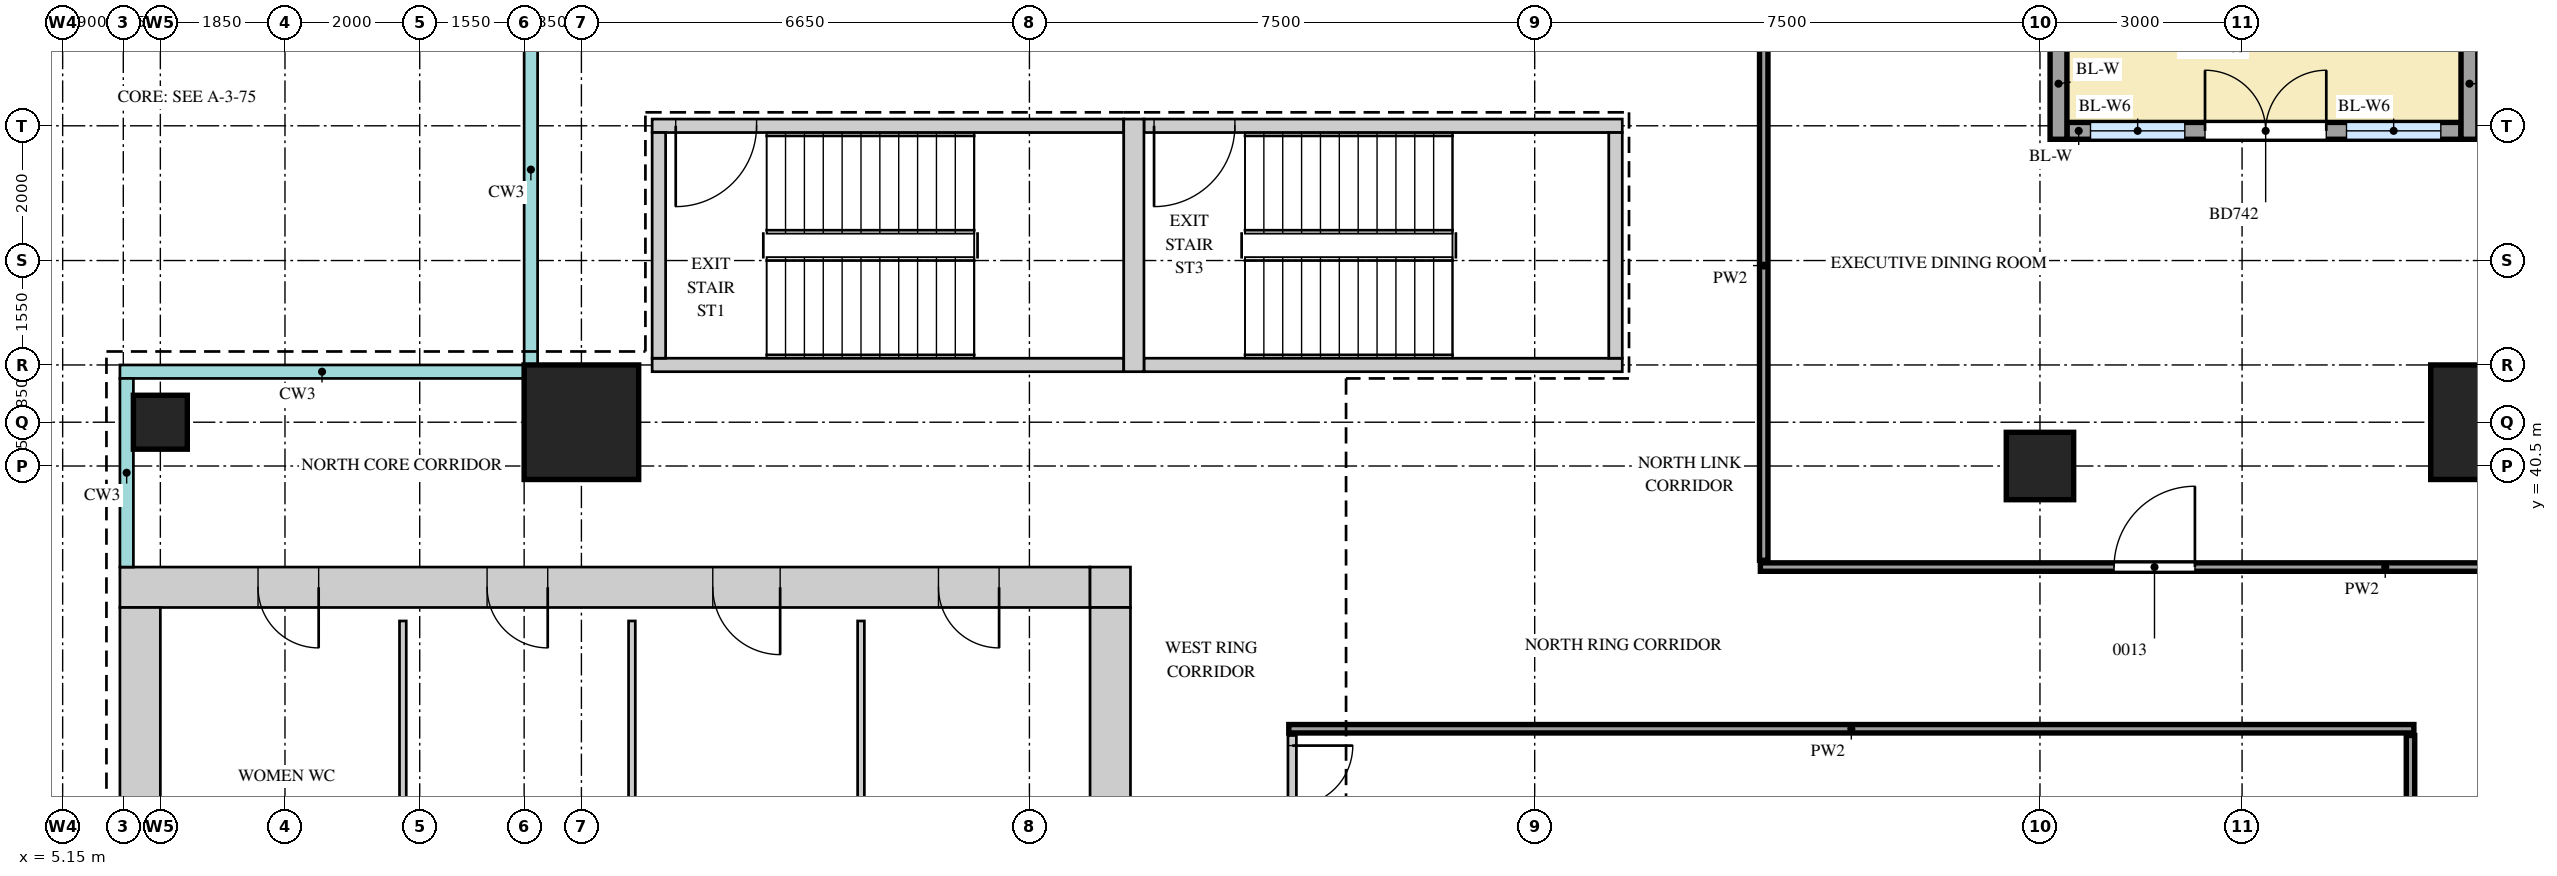
"""IFC4 building model, lengths in metres.
Left out: names, types, materials, properties, quantities, classifications, styles, units other than length and angle.
Written with IfcOpenShell. Run it as: python <this file> out.ifc"""

import sys

from ifc_helpers import new_model, si_unit, direction, frame, frame_2d, origin, origin_2d, place, context, subcontext, project, spatial, rectangle, extrude, source, transform, mapped, element, fill, save


model = new_model("IFC4")
c1 = context("Model", 3, precision=1e-05, world=origin(), true_north=direction((0.0, 1.0)))
c2 = subcontext(c1, "Body", "Model", "MODEL_VIEW")
j1 = project(units=[si_unit("LENGTHUNIT", "METRE"), si_unit("PLANEANGLEUNIT", "RADIAN")], contexts=[c1])
p1 = place(None, origin())
s1 = spatial("IfcSite", under=j1, at=p1, CompositionType="ELEMENT")
p2 = place(p1, origin())
s2 = spatial("IfcBuilding", under=s1, at=p2, CompositionType="ELEMENT")
p3 = place(p2, frame((0.0, 0.0, 326.2)))
s3 = spatial("IfcBuildingStorey", under=s2, at=p3, CompositionType="ELEMENT", Elevation=326.2)
m1 = source(origin(), c2, "Body", "SweptSolid", [
    extrude(rectangle(XDim=14.4, YDim=0.6, at=frame_2d((7.2, 0.0))), origin(), (0.0, 0.0, 1.0), 3.75),
])
p4 = place(p3, frame((6.0, 38.7, 0.0), z_axis=(0.0, 0.0, 1.0), x_axis=(1.0, 0.0, 0.0)))
e1 = element("IfcWall", 1, at=p4, inside=s3, PredefinedType="SHEAR", context=c2, shape_type="MappedRepresentation", body=[
    mapped(m1, transform((0.0, 0.0, 0.0))),
])
m2 = source(origin(), c2, "Body", "SweptSolid", [
    extrude(rectangle(XDim=0.9, YDim=2.1, at=frame_2d((0.45, 1.05))), frame((0.0, 0.31, 0.0), z_axis=(0.0, -1.0, 0.0), x_axis=(1.0, 0.0, 0.0)), (0.0, 0.0, 1.0), 0.62),
])
p5 = place(p4, frame((2.05, 0.0, 0.0)))
e2 = element("IfcOpeningElement", 2, at=p5, cuts=e1, PredefinedType="OPENING", context=c2, shape_type="MappedRepresentation", body=[
    mapped(m2, transform((0.0, 0.0, 0.0))),
])
p6 = place(p4, frame((5.45, 0.0, 0.0)))
e3 = element("IfcOpeningElement", 3, at=p6, cuts=e1, PredefinedType="OPENING", context=c2, shape_type="MappedRepresentation", body=[
    mapped(m2, transform((0.0, 0.0, 0.0))),
])
m3 = source(origin(), c2, "Body", "SweptSolid", [
    extrude(rectangle(XDim=1.0, YDim=2.1, at=frame_2d((0.5, 1.05))), frame((0.0, 0.31, 0.0), z_axis=(0.0, -1.0, 0.0), x_axis=(1.0, 0.0, 0.0)), (0.0, 0.0, 1.0), 0.62),
])
p7 = place(p4, frame((8.8, 0.0, 0.0)))
e4 = element("IfcOpeningElement", 4, at=p7, cuts=e1, PredefinedType="OPENING", context=c2, shape_type="MappedRepresentation", body=[
    mapped(m3, transform((0.0, 0.0, 0.0))),
])
p8 = place(p4, frame((12.15, 0.0, 0.0)))
e5 = element("IfcOpeningElement", 5, at=p8, cuts=e1, PredefinedType="OPENING", context=c2, shape_type="MappedRepresentation", body=[
    mapped(m2, transform((0.0, 0.0, 0.0))),
])
m4 = source(origin(), c2, "Body", "SweptSolid", [
    extrude(rectangle(XDim=0.6, YDim=0.6, at=frame_2d((0.3, 0.0))), origin(), (0.0, 0.0, 1.0), 3.75),
])
p9 = place(p3, frame((20.4, 38.7, 0.0), z_axis=(0.0, 0.0, 1.0), x_axis=(1.0, 0.0, 0.0)))
e6 = element("IfcWall", 6, at=p9, inside=s3, PredefinedType="SHEAR", context=c2, shape_type="MappedRepresentation", body=[
    mapped(m4, transform((0.0, 0.0, 0.0))),
])
m5 = source(origin(), c2, "Body", "SweptSolid", [
    extrude(rectangle(XDim=22.8, YDim=0.6, at=frame_2d((11.4, 0.0))), origin(), (0.0, 0.0, 1.0), 3.75),
])
p10 = place(p3, frame((20.7, 15.6, 0.0), z_axis=(0.0, 0.0, 1.0), x_axis=(0.0, 1.0, 0.0)))
e7 = element("IfcWall", 7, at=p10, inside=s3, PredefinedType="SHEAR", context=c2, shape_type="MappedRepresentation", body=[
    mapped(m5, transform((0.0, 0.0, 0.0))),
])
m6 = source(origin(), c2, "Body", "SweptSolid", [
    extrude(rectangle(XDim=1.8, YDim=2.1, at=frame_2d((0.9, 1.05))), frame((0.0, 0.31, 0.0), z_axis=(0.0, -1.0, 0.0), x_axis=(1.0, 0.0, 0.0)), (0.0, 0.0, 1.0), 0.62),
])
p11 = place(p10, frame((10.9, 0.0, 0.0)))
e8 = element("IfcOpeningElement", 8, at=p11, cuts=e7, PredefinedType="OPENING", context=c2, shape_type="MappedRepresentation", body=[
    mapped(m6, transform((0.0, 0.0, 0.0))),
])
p12 = place(p10, frame((0.55, 0.0, 0.0)))
e9 = element("IfcOpeningElement", 9, at=p12, cuts=e7, PredefinedType="OPENING", context=c2, shape_type="MappedRepresentation", body=[
    mapped(m2, transform((0.0, 0.0, 0.0))),
])
p13 = place(p10, frame((4.1, 0.0, 0.0)))
e10 = element("IfcOpeningElement", 10, at=p13, cuts=e7, PredefinedType="OPENING", context=c2, shape_type="MappedRepresentation", body=[
    mapped(m2, transform((0.0, 0.0, 0.0))),
])
p14 = place(p3, frame((6.3, 15.6, 0.0), z_axis=(0.0, 0.0, 1.0), x_axis=(0.0, 1.0, 0.0)))
e11 = element("IfcWall", 11, at=p14, inside=s3, PredefinedType="SHEAR", context=c2, shape_type="MappedRepresentation", body=[
    mapped(m5, transform((0.0, 0.0, 0.0))),
])
m7 = source(origin(), c2, "Body", "SweptSolid", [
    extrude(rectangle(XDim=7.0, YDim=0.2, at=frame_2d((3.5, 0.0))), origin(), (0.0, 0.0, 1.0), 3.75),
])
p15 = place(p3, frame((13.9, 45.55, 0.0), z_axis=(0.0, 0.0, 1.0), x_axis=(1.0, 0.0, 0.0)))
e12 = element("IfcWall", 12, at=p15, inside=s3, PredefinedType="SHEAR", context=c2, shape_type="MappedRepresentation", body=[
    mapped(m7, transform((0.0, 0.0, 0.0))),
])
m8 = source(origin(), c2, "Body", "SweptSolid", [
    extrude(rectangle(XDim=1.2, YDim=2.1, at=frame_2d((0.6, 1.05))), frame((0.0, 0.11, 0.0), z_axis=(0.0, -1.0, 0.0), x_axis=(1.0, 0.0, 0.0)), (0.0, 0.0, 1.0), 0.22),
])
p16 = place(p15, frame((0.35, 0.0, 0.0)))
e13 = element("IfcOpeningElement", 13, at=p16, cuts=e12, PredefinedType="OPENING", context=c2, shape_type="MappedRepresentation", body=[
    mapped(m8, transform((0.0, 0.0, 0.0))),
])
p17 = place(p3, frame((13.9, 42.0, 0.0), z_axis=(0.0, 0.0, 1.0), x_axis=(1.0, 0.0, 0.0)))
e14 = element("IfcWall", 14, at=p17, inside=s3, PredefinedType="SHEAR", context=c2, shape_type="MappedRepresentation", body=[
    mapped(m7, transform((0.0, 0.0, 0.0))),
])
m9 = source(origin(), c2, "Body", "SweptSolid", [
    extrude(rectangle(XDim=7.1, YDim=0.2, at=frame_2d((3.55, 0.0))), origin(), (0.0, 0.0, 1.0), 3.75),
])
p18 = place(p3, frame((21.2, 45.55, 0.0), z_axis=(0.0, 0.0, 1.0), x_axis=(1.0, 0.0, 0.0)))
e15 = element("IfcWall", 15, at=p18, inside=s3, PredefinedType="SHEAR", context=c2, shape_type="MappedRepresentation", body=[
    mapped(m9, transform((0.0, 0.0, 0.0))),
])
p19 = place(p18, frame((0.15, 0.0, 0.0)))
e16 = element("IfcOpeningElement", 16, at=p19, cuts=e15, PredefinedType="OPENING", context=c2, shape_type="MappedRepresentation", body=[
    mapped(m8, transform((0.0, 0.0, 0.0))),
])
p20 = place(p3, frame((21.2, 42.0, 0.0), z_axis=(0.0, 0.0, 1.0), x_axis=(1.0, 0.0, 0.0)))
e17 = element("IfcWall", 17, at=p20, inside=s3, PredefinedType="SHEAR", context=c2, shape_type="MappedRepresentation", body=[
    mapped(m9, transform((0.0, 0.0, 0.0))),
])
m10 = source(origin(), c2, "Body", "SweptSolid", [
    extrude(rectangle(XDim=3.75, YDim=0.3, at=frame_2d((1.875, 0.0))), origin(), (0.0, 0.0, 1.0), 3.75),
])
p21 = place(p3, frame((21.05, 41.9, 0.0), z_axis=(0.0, 0.0, 1.0), x_axis=(0.0, 1.0, 0.0)))
e18 = element("IfcWall", 18, at=p21, inside=s3, PredefinedType="SHEAR", context=c2, shape_type="MappedRepresentation", body=[
    mapped(m10, transform((0.0, 0.0, 0.0))),
])
m11 = source(origin(), c2, "Body", "SweptSolid", [
    extrude(rectangle(XDim=3.35, YDim=0.2, at=frame_2d((1.675, 0.0))), origin(), (0.0, 0.0, 1.0), 3.75),
])
for number, where, z_axis, x_axis in (
    (19, (14.0, 42.1, 0.0), (0.0, 0.0, 1.0), (0.0, 1.0, 0.0)),
    (20, (28.2, 42.1, 0.0), (0.0, 0.0, 1.0), (0.0, 1.0, 0.0)),
):
    element("IfcWall", number, at=place(p3, frame(where, z_axis=z_axis, x_axis=x_axis)), inside=s3, PredefinedType="SHEAR", context=c2, shape_type="MappedRepresentation", body=[
        mapped(m11, transform((0.0, 0.0, 0.0))),
    ])
m12 = source(origin(), c2, "Body", "SweptSolid", [
    extrude(rectangle(XDim=1.7, YDim=1.7, at=origin_2d()), origin(), (0.0, 0.0, 1.0), 3.75),
])
for number, where, z_axis, x_axis in (
    (21, (41.15, 41.15, 0.0), (0.0, 0.0, 1.0), (1.0, 0.0, 0.0)),
    (22, (12.85, 41.15, 0.0), (0.0, 0.0, 1.0), (1.0, 0.0, 0.0)),
):
    element("IfcColumn", number, at=place(p3, frame(where, z_axis=z_axis, x_axis=x_axis)), inside=s3, PredefinedType="COLUMN", context=c2, shape_type="MappedRepresentation", body=[
        mapped(m12, transform((0.0, 0.0, 0.0))),
    ])
m13 = source(origin(), c2, "Body", "SweptSolid", [
    extrude(rectangle(XDim=0.8, YDim=0.8, at=origin_2d()), origin(), (0.0, 0.0, 1.0), 3.75),
])
p22 = place(p3, frame((6.6, 41.15, 0.0), z_axis=(0.0, 0.0, 1.0), x_axis=(1.0, 0.0, 0.0)))
e23 = element("IfcColumn", 23, at=p22, inside=s3, PredefinedType="COLUMN", context=c2, shape_type="MappedRepresentation", body=[
    mapped(m13, transform((0.0, 0.0, 0.0))),
])
m14 = source(origin(), c2, "Body", "SweptSolid", [
    extrude(rectangle(XDim=1.0, YDim=1.0, at=origin_2d()), origin(), (0.0, 0.0, 1.0), 3.75),
])
p23 = place(p3, frame((34.5, 40.5, 0.0), z_axis=(0.0, 0.0, 1.0), x_axis=(1.0, 0.0, 0.0)))
e24 = element("IfcColumn", 24, at=p23, inside=s3, PredefinedType="COLUMN", context=c2, shape_type="MappedRepresentation", body=[
    mapped(m14, transform((0.0, 0.0, 0.0))),
])
m15 = source(origin(), c2, "Body", "SweptSolid", [
    extrude(rectangle(XDim=5.85, YDim=0.25, at=frame_2d((2.925, 0.0))), origin(), (0.0, 0.0, 1.0), 3.75),
])
p24 = place(p3, frame((34.9, 45.475, 0.0), z_axis=(0.0, 0.0, 1.0), x_axis=(1.0, 0.0, 0.0)))
e25 = element("IfcWall", 25, at=p24, inside=s3, PredefinedType="SOLIDWALL", context=c2, shape_type="MappedRepresentation", body=[
    mapped(m15, transform((0.0, 0.0, 0.0))),
])
m16 = source(origin(), c2, "Body", "SweptSolid", [
    extrude(rectangle(XDim=1.4, YDim=2.4, at=frame_2d((0.7, 1.2))), frame((0.0, 0.135, 0.0), z_axis=(0.0, -1.0, 0.0), x_axis=(1.0, 0.0, 0.0)), (0.0, 0.0, 1.0), 0.27),
])
p25 = place(p24, frame((0.35, 0.0, 0.0)))
e26 = element("IfcOpeningElement", 26, at=p25, cuts=e25, PredefinedType="OPENING", context=c2, shape_type="MappedRepresentation", body=[
    mapped(m16, transform((0.0, 0.0, 0.0))),
])
p26 = place(p24, frame((4.15, 0.0, 0.0)))
e27 = element("IfcOpeningElement", 27, at=p26, cuts=e25, PredefinedType="OPENING", context=c2, shape_type="MappedRepresentation", body=[
    mapped(m16, transform((0.0, 0.0, 0.0))),
])
m17 = source(origin(), c2, "Body", "SweptSolid", [
    extrude(rectangle(XDim=1.8, YDim=2.4, at=frame_2d((0.9, 1.2))), frame((0.0, 0.135, 0.0), z_axis=(0.0, -1.0, 0.0), x_axis=(1.0, 0.0, 0.0)), (0.0, 0.0, 1.0), 0.27),
])
p27 = place(p24, frame((2.05, 0.0, 0.0)))
e28 = element("IfcOpeningElement", 28, at=p27, cuts=e25, PredefinedType="OPENING", context=c2, shape_type="MappedRepresentation", body=[
    mapped(m17, transform((0.0, 0.0, 0.0))),
])
m18 = source(origin(), c2, "Body", "SweptSolid", [
    extrude(rectangle(XDim=1.65, YDim=0.25, at=frame_2d((0.825, 0.0))), origin(), (0.0, 0.0, 1.0), 3.75),
])
for number, where, z_axis, x_axis in (
    (29, (34.775, 47.0, 0.0), (0.0, 0.0, 1.0), (0.0, -1.0, 0.0)),
    (30, (40.875, 47.0, 0.0), (0.0, 0.0, 1.0), (0.0, -1.0, 0.0)),
):
    element("IfcWall", number, at=place(p3, frame(where, z_axis=z_axis, x_axis=x_axis)), inside=s3, PredefinedType="SOLIDWALL", context=c2, shape_type="MappedRepresentation", body=[
        mapped(m18, transform((0.0, 0.0, 0.0))),
    ])
m19 = source(origin(), c2, "Body", "SweptSolid", [
    extrude(rectangle(XDim=19.0, YDim=0.125, at=frame_2d((9.5, 0.0))), origin(), (0.0, 0.0, 1.0), 3.8),
])
p28 = place(p3, frame((23.4, 17.5, 0.0), z_axis=(0.0, 0.0, 1.0), x_axis=(0.0, 1.0, 0.0)))
e31 = element("IfcWall", 31, at=p28, inside=s3, PredefinedType="PARTITIONING", context=c2, shape_type="MappedRepresentation", body=[
    mapped(m19, transform((0.0, 0.0, 0.0))),
])
m20 = source(origin(), c2, "Body", "SweptSolid", [
    extrude(rectangle(XDim=1.2, YDim=2.1, at=frame_2d((0.6, 1.05))), frame((0.0, 0.073, 0.0), z_axis=(0.0, -1.0, 0.0), x_axis=(1.0, 0.0, 0.0)), (0.0, 0.0, 1.0), 0.145),
])
p29 = place(p28, frame((8.9, 0.0, 0.0)))
e32 = element("IfcOpeningElement", 32, at=p29, cuts=e31, PredefinedType="OPENING", context=c2, shape_type="MappedRepresentation", body=[
    mapped(m20, transform((0.0, 0.0, 0.0))),
])
m21 = source(origin(), c2, "Body", "SweptSolid", [
    extrude(rectangle(XDim=0.9, YDim=2.1, at=frame_2d((0.45, 1.05))), frame((0.0, 0.073, 0.0), z_axis=(0.0, -1.0, 0.0), x_axis=(1.0, 0.0, 0.0)), (0.0, 0.0, 1.0), 0.145),
])
p30 = place(p28, frame((17.95, 0.0, 0.0)))
e33 = element("IfcOpeningElement", 33, at=p30, cuts=e31, PredefinedType="OPENING", context=c2, shape_type="MappedRepresentation", body=[
    mapped(m21, transform((0.0, 0.0, 0.0))),
])
p31 = place(p3, frame((40.0, 17.5, 0.0), z_axis=(0.0, 0.0, 1.0), x_axis=(0.0, 1.0, 0.0)))
e34 = element("IfcWall", 34, at=p31, inside=s3, PredefinedType="PARTITIONING", context=c2, shape_type="MappedRepresentation", body=[
    mapped(m19, transform((0.0, 0.0, 0.0))),
])
m22 = source(origin(), c2, "Body", "SweptSolid", [
    extrude(rectangle(XDim=6.0, YDim=0.1, at=frame_2d((3.0, 0.0))), origin(), (0.0, 0.0, 1.0), 3.8),
])
for number, where, z_axis, x_axis in (
    (35, (10.2, 32.2, 0.0), (0.0, 0.0, 1.0), (0.0, 1.0, 0.0)),
    (36, (13.6, 32.2, 0.0), (0.0, 0.0, 1.0), (0.0, 1.0, 0.0)),
):
    element("IfcWall", number, at=place(p3, frame(where, z_axis=z_axis, x_axis=x_axis)), inside=s3, PredefinedType="PARTITIONING", context=c2, shape_type="MappedRepresentation", body=[
        mapped(m22, transform((0.0, 0.0, 0.0))),
    ])
m23 = source(origin(), c2, "Body", "SweptSolid", [
    extrude(rectangle(XDim=5.95, YDim=0.1, at=frame_2d((2.975, 0.0))), origin(), (0.0, 0.0, 1.0), 3.8),
])
p32 = place(p3, frame((17.0, 32.25, 0.0), z_axis=(0.0, 0.0, 1.0), x_axis=(0.0, 1.0, 0.0)))
e37 = element("IfcWall", 37, at=p32, inside=s3, PredefinedType="PARTITIONING", context=c2, shape_type="MappedRepresentation", body=[
    mapped(m23, transform((0.0, 0.0, 0.0))),
])
m24 = source(origin(), c2, "Body", "SweptSolid", [
    extrude(rectangle(XDim=16.7, YDim=0.125, at=frame_2d((8.35, 0.0))), origin(), (0.0, 0.0, 1.0), 3.8),
])
p33 = place(p3, frame((23.35, 36.6, 0.0), z_axis=(0.0, 0.0, 1.0), x_axis=(1.0, 0.0, 0.0)))
e38 = element("IfcWall", 38, at=p33, inside=s3, PredefinedType="PARTITIONING", context=c2, shape_type="MappedRepresentation", body=[
    mapped(m24, transform((0.0, 0.0, 0.0))),
])
m25 = source(origin(), c2, "Body", "SweptSolid", [
    extrude(rectangle(XDim=12.1, YDim=0.125, at=frame_2d((6.05, 0.0))), origin(), (0.0, 0.0, 1.0), 3.8),
])
p34 = place(p3, frame((30.35, 39.0, 0.0), z_axis=(0.0, 0.0, 1.0), x_axis=(1.0, 0.0, 0.0)))
e39 = element("IfcWall", 39, at=p34, inside=s3, PredefinedType="PARTITIONING", context=c2, shape_type="MappedRepresentation", body=[
    mapped(m25, transform((0.0, 0.0, 0.0))),
])
p35 = place(p34, frame((5.25, 0.0, 0.0)))
e40 = element("IfcOpeningElement", 40, at=p35, cuts=e39, PredefinedType="OPENING", context=c2, shape_type="MappedRepresentation", body=[
    mapped(m20, transform((0.0, 0.0, 0.0))),
])
m26 = source(origin(), c2, "Body", "SweptSolid", [
    extrude(rectangle(XDim=8.75, YDim=0.125, at=frame_2d((4.375, 0.0))), origin(), (0.0, 0.0, 1.0), 3.8),
])
p36 = place(p3, frame((30.4, 39.1, 0.0), z_axis=(0.0, 0.0, 1.0), x_axis=(0.0, 1.0, 0.0)))
e41 = element("IfcWall", 41, at=p36, inside=s3, PredefinedType="PARTITIONING", context=c2, shape_type="MappedRepresentation", body=[
    mapped(m26, transform((0.0, 0.0, 0.0))),
])
m27 = source(origin(), c2, "Body", "SweptSolid", [
    extrude(rectangle(XDim=1.4, YDim=2.4, at=frame_2d((0.7, 1.2))), frame((0.0, 0.03, 0.0), z_axis=(0.0, -1.0, 0.0), x_axis=(1.0, 0.0, 0.0)), (0.0, 0.0, 1.0), 0.06),
])
p37 = place(p25, origin())
e42 = element("IfcWindow", 42, at=p37, inside=s3, PartitioningType="SINGLE_PANEL", PredefinedType="WINDOW", context=c2, shape_type="MappedRepresentation", body=[
    mapped(m27, transform((0.0, 0.0, 0.0))),
])
fill(e26, e42)
p38 = place(p26, origin())
e43 = element("IfcWindow", 43, at=p38, inside=s3, PartitioningType="SINGLE_PANEL", PredefinedType="WINDOW", context=c2, shape_type="MappedRepresentation", body=[
    mapped(m27, transform((0.0, 0.0, 0.0))),
])
fill(e27, e43)
m28 = source(origin(), c2, "Body", "SweptSolid", [
    extrude(rectangle(XDim=1.8, YDim=2.4, at=frame_2d((0.9, 1.2))), frame((0.0, 0.025, 0.0), z_axis=(0.0, -1.0, 0.0), x_axis=(1.0, 0.0, 0.0)), (0.0, 0.0, 1.0), 0.05),
])
p39 = place(p27, origin())
e44 = element("IfcDoor", 44, at=p39, inside=s3, OperationType="DOUBLE_DOOR_DOUBLE_SWING", PredefinedType="DOOR", context=c2, shape_type="MappedRepresentation", body=[
    mapped(m28, transform((0.0, 0.0, 0.0))),
])
fill(e28, e44)
m29 = source(origin(), c2, "Body", "SweptSolid", [
    extrude(rectangle(XDim=0.9, YDim=2.1, at=frame_2d((0.45, 1.05))), frame((0.0, 0.25, 0.0), z_axis=(0.0, -1.0, 0.0), x_axis=(1.0, 0.0, 0.0)), (0.0, 0.0, 1.0), 0.5),
])
p40 = place(p5, origin())
e45 = element("IfcDoor", 45, at=p40, inside=s3, OperationType="SINGLE_SWING_RIGHT", PredefinedType="DOOR", context=c2, shape_type="MappedRepresentation", body=[
    mapped(m29, transform((0.0, 0.0, 0.0))),
])
fill(e2, e45)
p41 = place(p6, origin())
e46 = element("IfcDoor", 46, at=p41, inside=s3, OperationType="SINGLE_SWING_RIGHT", PredefinedType="DOOR", context=c2, shape_type="MappedRepresentation", body=[
    mapped(m29, transform((0.0, 0.0, 0.0))),
])
fill(e3, e46)
m30 = source(origin(), c2, "Body", "SweptSolid", [
    extrude(rectangle(XDim=1.0, YDim=2.1, at=frame_2d((0.5, 1.05))), frame((0.0, 0.25, 0.0), z_axis=(0.0, -1.0, 0.0), x_axis=(1.0, 0.0, 0.0)), (0.0, 0.0, 1.0), 0.5),
])
p42 = place(p7, origin())
e47 = element("IfcDoor", 47, at=p42, inside=s3, OperationType="SINGLE_SWING_RIGHT", PredefinedType="DOOR", context=c2, shape_type="MappedRepresentation", body=[
    mapped(m30, transform((0.0, 0.0, 0.0))),
])
fill(e4, e47)
p43 = place(p8, origin())
e48 = element("IfcDoor", 48, at=p43, inside=s3, OperationType="SINGLE_SWING_RIGHT", PredefinedType="DOOR", context=c2, shape_type="MappedRepresentation", body=[
    mapped(m29, transform((0.0, 0.0, 0.0))),
])
fill(e5, e48)
m31 = source(origin(), c2, "Body", "SweptSolid", [
    extrude(rectangle(XDim=1.2, YDim=2.1, at=frame_2d((0.6, 1.05))), frame((0.0, 0.025, 0.0), z_axis=(0.0, -1.0, 0.0), x_axis=(1.0, 0.0, 0.0)), (0.0, 0.0, 1.0), 0.05),
])
p44 = place(p35, origin())
e49 = element("IfcDoor", 49, at=p44, inside=s3, OperationType="SINGLE_SWING_LEFT", PredefinedType="DOOR", context=c2, shape_type="MappedRepresentation", body=[
    mapped(m31, transform((0.0, 0.0, 0.0))),
])
fill(e40, e49)
m32 = source(origin(), c2, "Body", "SweptSolid", [
    extrude(rectangle(XDim=0.9, YDim=2.1, at=frame_2d((0.45, 1.05))), frame((0.0, 0.025, 0.0), z_axis=(0.0, -1.0, 0.0), x_axis=(1.0, 0.0, 0.0)), (0.0, 0.0, 1.0), 0.05),
])
p45 = place(p30, origin())
e50 = element("IfcDoor", 50, at=p45, inside=s3, OperationType="SINGLE_SWING_RIGHT", PredefinedType="DOOR", context=c2, shape_type="MappedRepresentation", body=[
    mapped(m32, transform((0.0, 0.0, 0.0))),
])
fill(e33, e50)
p46 = place(p16, origin())
e51 = element("IfcDoor", 51, at=p46, inside=s3, OperationType="SINGLE_SWING_LEFT", PredefinedType="DOOR", context=c2, shape_type="MappedRepresentation", body=[
    mapped(m31, transform((0.0, 0.0, 0.0))),
])
fill(e13, e51)
p47 = place(p19, origin())
e52 = element("IfcDoor", 52, at=p47, inside=s3, OperationType="SINGLE_SWING_LEFT", PredefinedType="DOOR", context=c2, shape_type="MappedRepresentation", body=[
    mapped(m31, transform((0.0, 0.0, 0.0))),
])
fill(e16, e52)
save(model, sys.argv[1])
